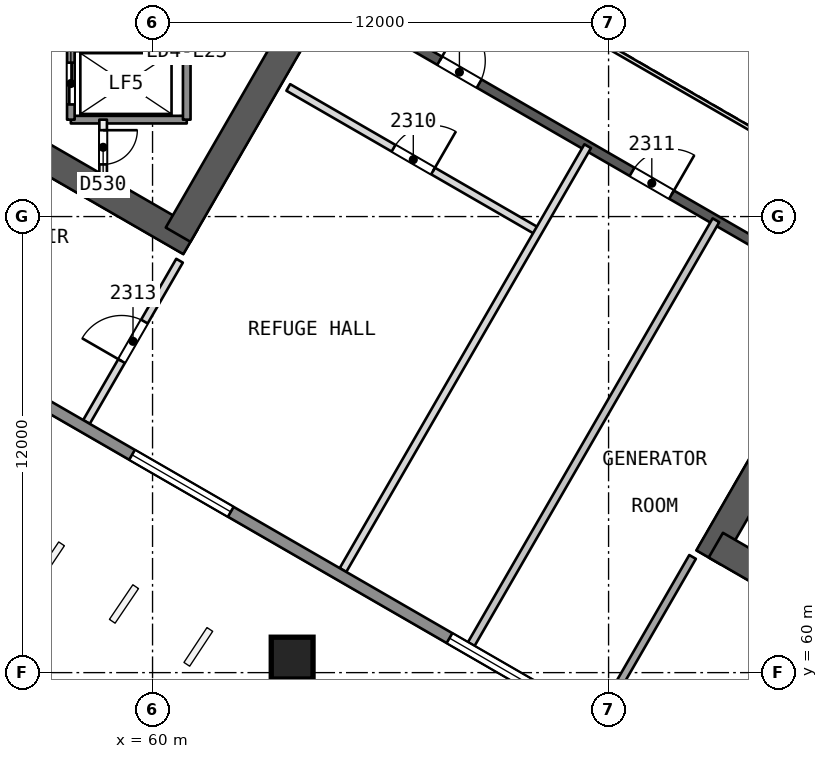
"""IFC4 building model, lengths in metres.
Left out: names, types, materials, properties, quantities, classifications, styles, units other than length and angle.
Written with IfcOpenShell. Run it as: python <this file> out.ifc"""

import sys

from ifc_helpers import new_model, si_unit, direction, frame, frame_2d, origin, origin_2d, place, context, subcontext, project, spatial, rectangle, extrude, element, fill, save


model = new_model("IFC4")
c1 = context("Model", 3, precision=1e-05, world=origin(), true_north=direction((0.0, 1.0)))
c2 = subcontext(c1, "Body", "Model", "MODEL_VIEW")
j1 = project(units=[si_unit("LENGTHUNIT", "METRE"), si_unit("PLANEANGLEUNIT", "RADIAN")], contexts=[c1])
p1 = place(None, origin())
s1 = spatial("IfcSite", under=j1, at=p1, CompositionType="ELEMENT")
p2 = place(p1, origin())
s2 = spatial("IfcBuilding", under=s1, at=p2, CompositionType="ELEMENT")
p3 = place(p2, frame((0.0, 0.0, 98.0)))
s3 = spatial("IfcBuildingStorey", under=s2, at=p3, CompositionType="ELEMENT", Elevation=98.0)
p4 = place(p3, frame((48.772, 78.394, 0.0), z_axis=(0.0, 0.0, 1.0), x_axis=(0.866028339916, -0.499994914436, 0.0)))
e1 = element("IfcWall", 1, at=p4, inside=s3, PredefinedType="SHEAR", context=c2, shape_type="SweptSolid", body=[
    extrude(rectangle(XDim=14.117, YDim=0.75, at=frame_2d((7.059, 0.0))), origin(), (0.0, 0.0, 1.0), 4.4),
])
p5 = place(p3, frame((60.673, 71.523, 0.0), z_axis=(0.0, 0.0, 1.0), x_axis=(0.499997052475, 0.866027105532, 0.0)))
e2 = element("IfcWall", 2, at=p5, inside=s3, PredefinedType="SHEAR", context=c2, shape_type="SweptSolid", body=[
    extrude(rectangle(XDim=10.005, YDim=0.75, at=frame_2d((5.002, 0.0))), origin(), (0.0, 0.0, 1.0), 4.4),
])
p6 = place(p5, frame((7.855, 0.0, 0.0)))
e3 = element("IfcOpeningElement", 3, at=p6, cuts=e2, PredefinedType="OPENING", context=c2, shape_type="SweptSolid", body=[
    extrude(rectangle(XDim=1.2, YDim=2.1, at=frame_2d((0.6, 1.05))), frame((0.0, 0.385, 0.0), z_axis=(0.0, -1.0, 0.0), x_axis=(1.0, 0.0, 0.0)), (0.0, 0.0, 1.0), 0.771),
])
p7 = place(p3, frame((79.717, 71.831, 0.0), z_axis=(0.0, 0.0, 1.0), x_axis=(-0.499996230114, -0.866027580318, 0.0)))
e4 = element("IfcWall", 4, at=p7, inside=s3, PredefinedType="SHEAR", context=c2, shape_type="SweptSolid", body=[
    extrude(rectangle(XDim=10.164, YDim=0.75, at=frame_2d((5.082, 0.0))), origin(), (0.0, 0.0, 1.0), 4.4),
])
p8 = place(p7, frame((0.733, 0.0, 0.0)))
e5 = element("IfcOpeningElement", 5, at=p8, cuts=e4, PredefinedType="OPENING", context=c2, shape_type="SweptSolid", body=[
    extrude(rectangle(XDim=1.2, YDim=2.1, at=frame_2d((0.6, 1.05))), frame((0.0, 0.385, 0.0), z_axis=(0.0, -1.0, 0.0), x_axis=(1.0, 0.0, 0.0)), (0.0, 0.0, 1.0), 0.771),
])
p9 = place(p3, frame((74.822, 63.354, 0.0), z_axis=(0.0, 0.0, 1.0), x_axis=(0.8660248072, -0.500001033313, 0.0)))
e6 = element("IfcWall", 6, at=p9, inside=s3, PredefinedType="SHEAR", context=c2, shape_type="SweptSolid", body=[
    extrude(rectangle(XDim=13.958, YDim=0.75, at=frame_2d((6.979, 0.0))), origin(), (0.0, 0.0, 1.0), 4.4),
])
p10 = place(p3, frame((64.7, 77.748, 0.0), z_axis=(0.0, 0.0, 1.0), x_axis=(0.866026492143, -0.499998114903, 0.0)))
e7 = element("IfcWall", 7, at=p10, inside=s3, PredefinedType="SHEAR", context=c2, shape_type="SweptSolid", body=[
    extrude(rectangle(XDim=15.588, YDim=0.25, at=frame_2d((7.794, 0.0))), origin(), (0.0, 0.0, 1.0), 3.9),
])
p11 = place(p10, frame((3.297, 0.0, 0.0)))
e8 = element("IfcOpeningElement", 8, at=p11, cuts=e7, PredefinedType="OPENING", context=c2, shape_type="SweptSolid", body=[
    extrude(rectangle(XDim=1.2, YDim=2.4, at=frame_2d((0.6, 1.2))), frame((0.0, 0.135, 0.0), z_axis=(0.0, -1.0, 0.0), x_axis=(1.0, 0.0, 0.0)), (0.0, 0.0, 1.0), 0.271),
])
p12 = place(p10, frame((9.143, 0.0, 0.0)))
e9 = element("IfcOpeningElement", 9, at=p12, cuts=e7, PredefinedType="OPENING", context=c2, shape_type="SweptSolid", body=[
    extrude(rectangle(XDim=1.2, YDim=2.4, at=frame_2d((0.6, 1.2))), frame((0.0, 0.135, 0.0), z_axis=(0.0, -1.0, 0.0), x_axis=(1.0, 0.0, 0.0)), (0.0, 0.0, 1.0), 0.271),
])
p13 = place(p10, frame((13.04, 0.0, 0.0)))
e10 = element("IfcOpeningElement", 10, at=p13, cuts=e7, PredefinedType="OPENING", context=c2, shape_type="SweptSolid", body=[
    extrude(rectangle(XDim=1.2, YDim=2.4, at=frame_2d((0.6, 1.2))), frame((0.0, 0.135, 0.0), z_axis=(0.0, -1.0, 0.0), x_axis=(1.0, 0.0, 0.0)), (0.0, 0.0, 1.0), 0.271),
])
p14 = place(p3, frame((63.661, 60.361, 0.0), z_axis=(0.010096711238, 0.017475077143, 0.999796318307), x_axis=(-0.500180400372, -0.865685996874, 0.020182217394)))
e11 = element("IfcColumn", 11, at=p14, inside=s3, PredefinedType="COLUMN", context=c2, shape_type="SweptSolid", body=[
    extrude(rectangle(XDim=1.1, YDim=1.1, at=origin_2d()), origin(), (0.0, 0.0, 1.0), 4.401),
])
p15 = place(p3, frame((63.572, 75.397, 0.0), z_axis=(0.0, 0.0, 1.0), x_axis=(0.866024999478, -0.500000700278, 0.0)))
e12 = element("IfcWall", 12, at=p15, inside=s3, PredefinedType="PARTITIONING", context=c2, shape_type="SweptSolid", body=[
    extrude(rectangle(XDim=7.595, YDim=0.2, at=frame_2d((3.798, 0.0))), origin(), (0.0, 0.0, 1.0), 3.9),
])
p16 = place(p15, frame((3.198, 0.0, 0.0)))
e13 = element("IfcOpeningElement", 13, at=p16, cuts=e12, PredefinedType="OPENING", context=c2, shape_type="SweptSolid", body=[
    extrude(rectangle(XDim=1.2, YDim=2.4, at=frame_2d((0.6, 1.2))), frame((0.0, 0.11, 0.0), z_axis=(0.0, -1.0, 0.0), x_axis=(1.0, 0.0, 0.0)), (0.0, 0.0, 1.0), 0.221),
])
p17 = place(p3, frame((65.011, 62.698, 0.0), z_axis=(0.0, 0.0, 1.0), x_axis=(0.499992677578, 0.866029631346, 0.0)))
e14 = element("IfcWall", 14, at=p17, inside=s3, PredefinedType="PARTITIONING", context=c2, shape_type="SweptSolid", body=[
    extrude(rectangle(XDim=12.878, YDim=0.2, at=frame_2d((6.439, 0.0))), origin(), (0.0, 0.0, 1.0), 3.9),
])
p18 = place(p3, frame((58.261, 66.595, 0.0), z_axis=(0.0, 0.0, 1.0), x_axis=(0.499971209087, 0.866042025588, 0.0)))
e15 = element("IfcWall", 15, at=p18, inside=s3, PredefinedType="PARTITIONING", context=c2, shape_type="SweptSolid", body=[
    extrude(rectangle(XDim=4.899, YDim=0.2, at=frame_2d((2.45, 0.0))), origin(), (0.0, 0.0, 1.0), 3.9),
])
p19 = place(p18, frame((1.85, 0.0, 0.0)))
e16 = element("IfcOpeningElement", 16, at=p19, cuts=e15, PredefinedType="OPENING", context=c2, shape_type="SweptSolid", body=[
    extrude(rectangle(XDim=1.2, YDim=2.4, at=frame_2d((0.6, 1.2))), frame((0.0, 0.11, 0.0), z_axis=(0.0, -1.0, 0.0), x_axis=(1.0, 0.0, 0.0)), (0.0, 0.0, 1.0), 0.221),
])
p20 = place(p3, frame((68.386, 60.75, 0.0), z_axis=(0.0, 0.0, 1.0), x_axis=(0.499992677578, 0.866029631346, 0.0)))
e17 = element("IfcWall", 17, at=p20, inside=s3, PredefinedType="PARTITIONING", context=c2, shape_type="SweptSolid", body=[
    extrude(rectangle(XDim=12.878, YDim=0.2, at=frame_2d((6.439, 0.0))), origin(), (0.0, 0.0, 1.0), 3.9),
])
p21 = place(p3, frame((74.21, 63.044, 0.0), z_axis=(0.0, 0.0, 1.0), x_axis=(-0.499971209087, -0.866042025588, 0.0)))
e18 = element("IfcWall", 18, at=p21, inside=s3, PredefinedType="PARTITIONING", context=c2, shape_type="SweptSolid", body=[
    extrude(rectangle(XDim=4.899, YDim=0.2, at=frame_2d((2.45, 0.0))), origin(), (0.0, 0.0, 1.0), 3.9),
])
p22 = place(p3, frame((89.998, 48.1, 0.0), z_axis=(0.0, 0.0, 1.0), x_axis=(-0.866025498246, 0.499999836387, 0.0)))
e19 = element("IfcWall", 19, at=p22, inside=s3, PredefinedType="SOLIDWALL", context=c2, shape_type="SweptSolid", body=[
    extrude(rectangle(XDim=57.878, YDim=0.3, at=frame_2d((28.939, 0.0))), origin(), (0.0, 0.0, 1.0), 3.9),
])
p23 = place(p22, frame((3.323, 0.0, 0.6)))
e20 = element("IfcOpeningElement", 20, at=p23, cuts=e19, PredefinedType="OPENING", context=c2, shape_type="SweptSolid", body=[
    extrude(rectangle(XDim=3.0, YDim=2.4, at=frame_2d((1.5, 1.2))), frame((0.0, 0.161, 0.0), z_axis=(0.0, -1.0, 0.0), x_axis=(1.0, 0.0, 0.0)), (0.0, 0.0, 1.0), 0.321),
])
p24 = place(p22, frame((12.969, 0.0, 0.6)))
e21 = element("IfcOpeningElement", 21, at=p24, cuts=e19, PredefinedType="OPENING", context=c2, shape_type="SweptSolid", body=[
    extrude(rectangle(XDim=3.0, YDim=2.4, at=frame_2d((1.5, 1.2))), frame((0.0, 0.161, 0.0), z_axis=(0.0, -1.0, 0.0), x_axis=(1.0, 0.0, 0.0)), (0.0, 0.0, 1.0), 0.321),
])
p25 = place(p22, frame((22.616, 0.0, 0.6)))
e22 = element("IfcOpeningElement", 22, at=p25, cuts=e19, PredefinedType="OPENING", context=c2, shape_type="SweptSolid", body=[
    extrude(rectangle(XDim=3.0, YDim=2.4, at=frame_2d((1.5, 1.2))), frame((0.0, 0.161, 0.0), z_axis=(0.0, -1.0, 0.0), x_axis=(1.0, 0.0, 0.0)), (0.0, 0.0, 1.0), 0.321),
])
p26 = place(p22, frame((32.262, 0.0, 0.6)))
e23 = element("IfcOpeningElement", 23, at=p26, cuts=e19, PredefinedType="OPENING", context=c2, shape_type="SweptSolid", body=[
    extrude(rectangle(XDim=3.0, YDim=2.4, at=frame_2d((1.5, 1.2))), frame((0.0, 0.161, 0.0), z_axis=(0.0, -1.0, 0.0), x_axis=(1.0, 0.0, 0.0)), (0.0, 0.0, 1.0), 0.321),
])
p27 = place(p22, frame((41.908, 0.0, 0.6)))
e24 = element("IfcOpeningElement", 24, at=p27, cuts=e19, PredefinedType="OPENING", context=c2, shape_type="SweptSolid", body=[
    extrude(rectangle(XDim=3.0, YDim=2.4, at=frame_2d((1.5, 1.2))), frame((0.0, 0.161, 0.0), z_axis=(0.0, -1.0, 0.0), x_axis=(1.0, 0.0, 0.0)), (0.0, 0.0, 1.0), 0.321),
])
p28 = place(p22, frame((51.555, 0.0, 0.6)))
e25 = element("IfcOpeningElement", 25, at=p28, cuts=e19, PredefinedType="OPENING", context=c2, shape_type="SweptSolid", body=[
    extrude(rectangle(XDim=3.0, YDim=2.4, at=frame_2d((1.5, 1.2))), frame((0.0, 0.161, 0.0), z_axis=(0.0, -1.0, 0.0), x_axis=(1.0, 0.0, 0.0)), (0.0, 0.0, 1.0), 0.321),
])
p29 = place(p3, frame((60.9, 74.55, 0.0), z_axis=(0.0, 0.0, 1.0), x_axis=(-1.0, 0.0, 0.0)))
e26 = element("IfcWall", 26, at=p29, inside=s3, PredefinedType="SOLIDWALL", context=c2, shape_type="SweptSolid", body=[
    extrude(rectangle(XDim=3.05, YDim=0.2, at=frame_2d((1.525, 0.0))), origin(), (0.0, 0.0, 1.0), 3.9),
])
p30 = place(p3, frame((60.9, 85.45, 0.0), z_axis=(0.0, 0.0, 1.0), x_axis=(0.0, -1.0, 0.0)))
e27 = element("IfcWall", 27, at=p30, inside=s3, PredefinedType="SOLIDWALL", context=c2, shape_type="SweptSolid", body=[
    extrude(rectangle(XDim=10.9, YDim=0.2, at=frame_2d((5.45, 0.0))), origin(), (0.0, 0.0, 1.0), 3.9),
])
p31 = place(p30, frame((0.575, 0.0, 0.0)))
e28 = element("IfcOpeningElement", 28, at=p31, cuts=e27, PredefinedType="OPENING", context=c2, shape_type="SweptSolid", body=[
    extrude(rectangle(XDim=1.1, YDim=2.1, at=frame_2d((0.55, 1.05))), frame((0.0, 0.11, 0.0), z_axis=(0.0, -1.0, 0.0), x_axis=(1.0, 0.0, 0.0)), (0.0, 0.0, 1.0), 0.221),
])
p32 = place(p30, frame((2.825, 0.0, 0.0)))
e29 = element("IfcOpeningElement", 29, at=p32, cuts=e27, PredefinedType="OPENING", context=c2, shape_type="SweptSolid", body=[
    extrude(rectangle(XDim=1.1, YDim=2.1, at=frame_2d((0.55, 1.05))), frame((0.0, 0.11, 0.0), z_axis=(0.0, -1.0, 0.0), x_axis=(1.0, 0.0, 0.0)), (0.0, 0.0, 1.0), 0.221),
])
p33 = place(p30, frame((5.075, 0.0, 0.0)))
e30 = element("IfcOpeningElement", 30, at=p33, cuts=e27, PredefinedType="OPENING", context=c2, shape_type="SweptSolid", body=[
    extrude(rectangle(XDim=1.1, YDim=2.1, at=frame_2d((0.55, 1.05))), frame((0.0, 0.11, 0.0), z_axis=(0.0, -1.0, 0.0), x_axis=(1.0, 0.0, 0.0)), (0.0, 0.0, 1.0), 0.221),
])
p34 = place(p30, frame((7.325, 0.0, 0.0)))
e31 = element("IfcOpeningElement", 31, at=p34, cuts=e27, PredefinedType="OPENING", context=c2, shape_type="SweptSolid", body=[
    extrude(rectangle(XDim=1.1, YDim=2.1, at=frame_2d((0.55, 1.05))), frame((0.0, 0.11, 0.0), z_axis=(0.0, -1.0, 0.0), x_axis=(1.0, 0.0, 0.0)), (0.0, 0.0, 1.0), 0.221),
])
p35 = place(p3, frame((58.7, 74.55, 0.0), z_axis=(0.0, 0.0, 1.0), x_axis=(0.0, -1.0, 0.0)))
e32 = element("IfcWall", 32, at=p35, inside=s3, PredefinedType="PARTITIONING", context=c2, shape_type="SweptSolid", body=[
    extrude(rectangle(XDim=1.455, YDim=0.2, at=frame_2d((0.728, 0.0))), origin(), (0.0, 0.0, 1.0), 3.9),
])
p36 = place(p35, frame((0.278, 0.0, 0.0)))
e33 = element("IfcOpeningElement", 33, at=p36, cuts=e32, PredefinedType="OPENING", context=c2, shape_type="SweptSolid", body=[
    extrude(rectangle(XDim=0.9, YDim=2.1, at=frame_2d((0.45, 1.05))), frame((0.0, 0.11, 0.0), z_axis=(0.0, -1.0, 0.0), x_axis=(1.0, 0.0, 0.0)), (0.0, 0.0, 1.0), 0.221),
])
p37 = place(p3, frame((57.85, 76.45, 0.0), z_axis=(0.0, 0.0, 1.0), x_axis=(0.0, -1.0, 0.0)))
e34 = element("IfcWall", 34, at=p37, inside=s3, PredefinedType="SOLIDWALL", context=c2, shape_type="SweptSolid", body=[
    extrude(rectangle(XDim=1.9, YDim=0.2, at=frame_2d((0.95, 0.0))), origin(), (0.0, 0.0, 1.0), 3.9),
])
p38 = place(p37, frame((0.4, 0.0, 0.0)))
e35 = element("IfcOpeningElement", 35, at=p38, cuts=e34, PredefinedType="OPENING", context=c2, shape_type="SweptSolid", body=[
    extrude(rectangle(XDim=1.1, YDim=2.1, at=frame_2d((0.55, 1.05))), frame((0.0, 0.11, 0.0), z_axis=(0.0, -1.0, 0.0), x_axis=(1.0, 0.0, 0.0)), (0.0, 0.0, 1.0), 0.221),
])
p39 = place(p3, frame((67.702, 78.948, 0.0), z_axis=(0.0, 0.0, 1.0), x_axis=(0.866026658274, -0.499997827154, 0.0)))
e36 = element("IfcWall", 36, at=p39, inside=s3, PredefinedType="PARTITIONING", context=c2, shape_type="SweptSolid", body=[
    extrude(rectangle(XDim=11.588, YDim=0.1, at=frame_2d((5.794, 0.0))), origin(), (0.0, 0.0, 1.0), 3.9),
])
p40 = place(p11, origin())
e37 = element("IfcDoor", 37, at=p40, inside=s3, OperationType="SINGLE_SWING_LEFT", PredefinedType="NOTDEFINED", context=c2, shape_type="SweptSolid", body=[
    extrude(rectangle(XDim=1.2, YDim=2.4, at=frame_2d((0.6, 1.2))), frame((0.0, 0.025, 0.0), z_axis=(0.0, -1.0, 0.0), x_axis=(1.0, 0.0, 0.0)), (0.0, 0.0, 1.0), 0.05),
])
fill(e8, e37)
p41 = place(p16, origin())
e38 = element("IfcDoor", 38, at=p41, inside=s3, OperationType="SINGLE_SWING_RIGHT", PredefinedType="NOTDEFINED", context=c2, shape_type="SweptSolid", body=[
    extrude(rectangle(XDim=1.2, YDim=2.4, at=frame_2d((0.6, 1.2))), frame((0.0, 0.025, 0.0), z_axis=(0.0, -1.0, 0.0), x_axis=(1.0, 0.0, 0.0)), (0.0, 0.0, 1.0), 0.05),
])
fill(e13, e38)
p42 = place(p12, origin())
e39 = element("IfcDoor", 39, at=p42, inside=s3, OperationType="SINGLE_SWING_RIGHT", PredefinedType="NOTDEFINED", context=c2, shape_type="SweptSolid", body=[
    extrude(rectangle(XDim=1.2, YDim=2.4, at=frame_2d((0.6, 1.2))), frame((0.0, 0.025, 0.0), z_axis=(0.0, -1.0, 0.0), x_axis=(1.0, 0.0, 0.0)), (0.0, 0.0, 1.0), 0.05),
])
fill(e9, e39)
p43 = place(p19, origin())
e40 = element("IfcDoor", 40, at=p43, inside=s3, OperationType="SINGLE_SWING_LEFT", PredefinedType="NOTDEFINED", context=c2, shape_type="SweptSolid", body=[
    extrude(rectangle(XDim=1.2, YDim=2.4, at=frame_2d((0.6, 1.2))), frame((0.0, 0.025, 0.0), z_axis=(0.0, -1.0, 0.0), x_axis=(1.0, 0.0, 0.0)), (0.0, 0.0, 1.0), 0.05),
])
fill(e16, e40)
p44 = place(p25, origin())
e41 = element("IfcWindow", 41, at=p44, inside=s3, PartitioningType="SINGLE_PANEL", PredefinedType="WINDOW", context=c2, shape_type="SweptSolid", body=[
    extrude(rectangle(XDim=3.0, YDim=2.4, at=frame_2d((1.5, 1.2))), frame((0.0, 0.03, 0.0), z_axis=(0.0, -1.0, 0.0), x_axis=(1.0, 0.0, 0.0)), (0.0, 0.0, 1.0), 0.06),
])
fill(e22, e41)
p45 = place(p26, origin())
e42 = element("IfcWindow", 42, at=p45, inside=s3, PartitioningType="SINGLE_PANEL", PredefinedType="WINDOW", context=c2, shape_type="SweptSolid", body=[
    extrude(rectangle(XDim=3.0, YDim=2.4, at=frame_2d((1.5, 1.2))), frame((0.0, 0.03, 0.0), z_axis=(0.0, -1.0, 0.0), x_axis=(1.0, 0.0, 0.0)), (0.0, 0.0, 1.0), 0.06),
])
fill(e23, e42)
p46 = place(p38, origin())
e43 = element("IfcDoor", 43, at=p46, inside=s3, OperationType="SLIDING_TO_RIGHT", PredefinedType="NOTDEFINED", context=c2, shape_type="SweptSolid", body=[
    extrude(rectangle(XDim=1.1, YDim=2.1, at=frame_2d((0.55, 1.05))), frame((0.0, 0.025, 0.0), z_axis=(0.0, -1.0, 0.0), x_axis=(1.0, 0.0, 0.0)), (0.0, 0.0, 1.0), 0.05),
])
fill(e35, e43)
p47 = place(p36, origin())
e44 = element("IfcDoor", 44, at=p47, inside=s3, OperationType="SINGLE_SWING_LEFT", PredefinedType="NOTDEFINED", context=c2, shape_type="SweptSolid", body=[
    extrude(rectangle(XDim=0.9, YDim=2.1, at=frame_2d((0.45, 1.05))), frame((0.0, 0.025, 0.0), z_axis=(0.0, -1.0, 0.0), x_axis=(1.0, 0.0, 0.0)), (0.0, 0.0, 1.0), 0.05),
])
fill(e33, e44)
save(model, sys.argv[1])
